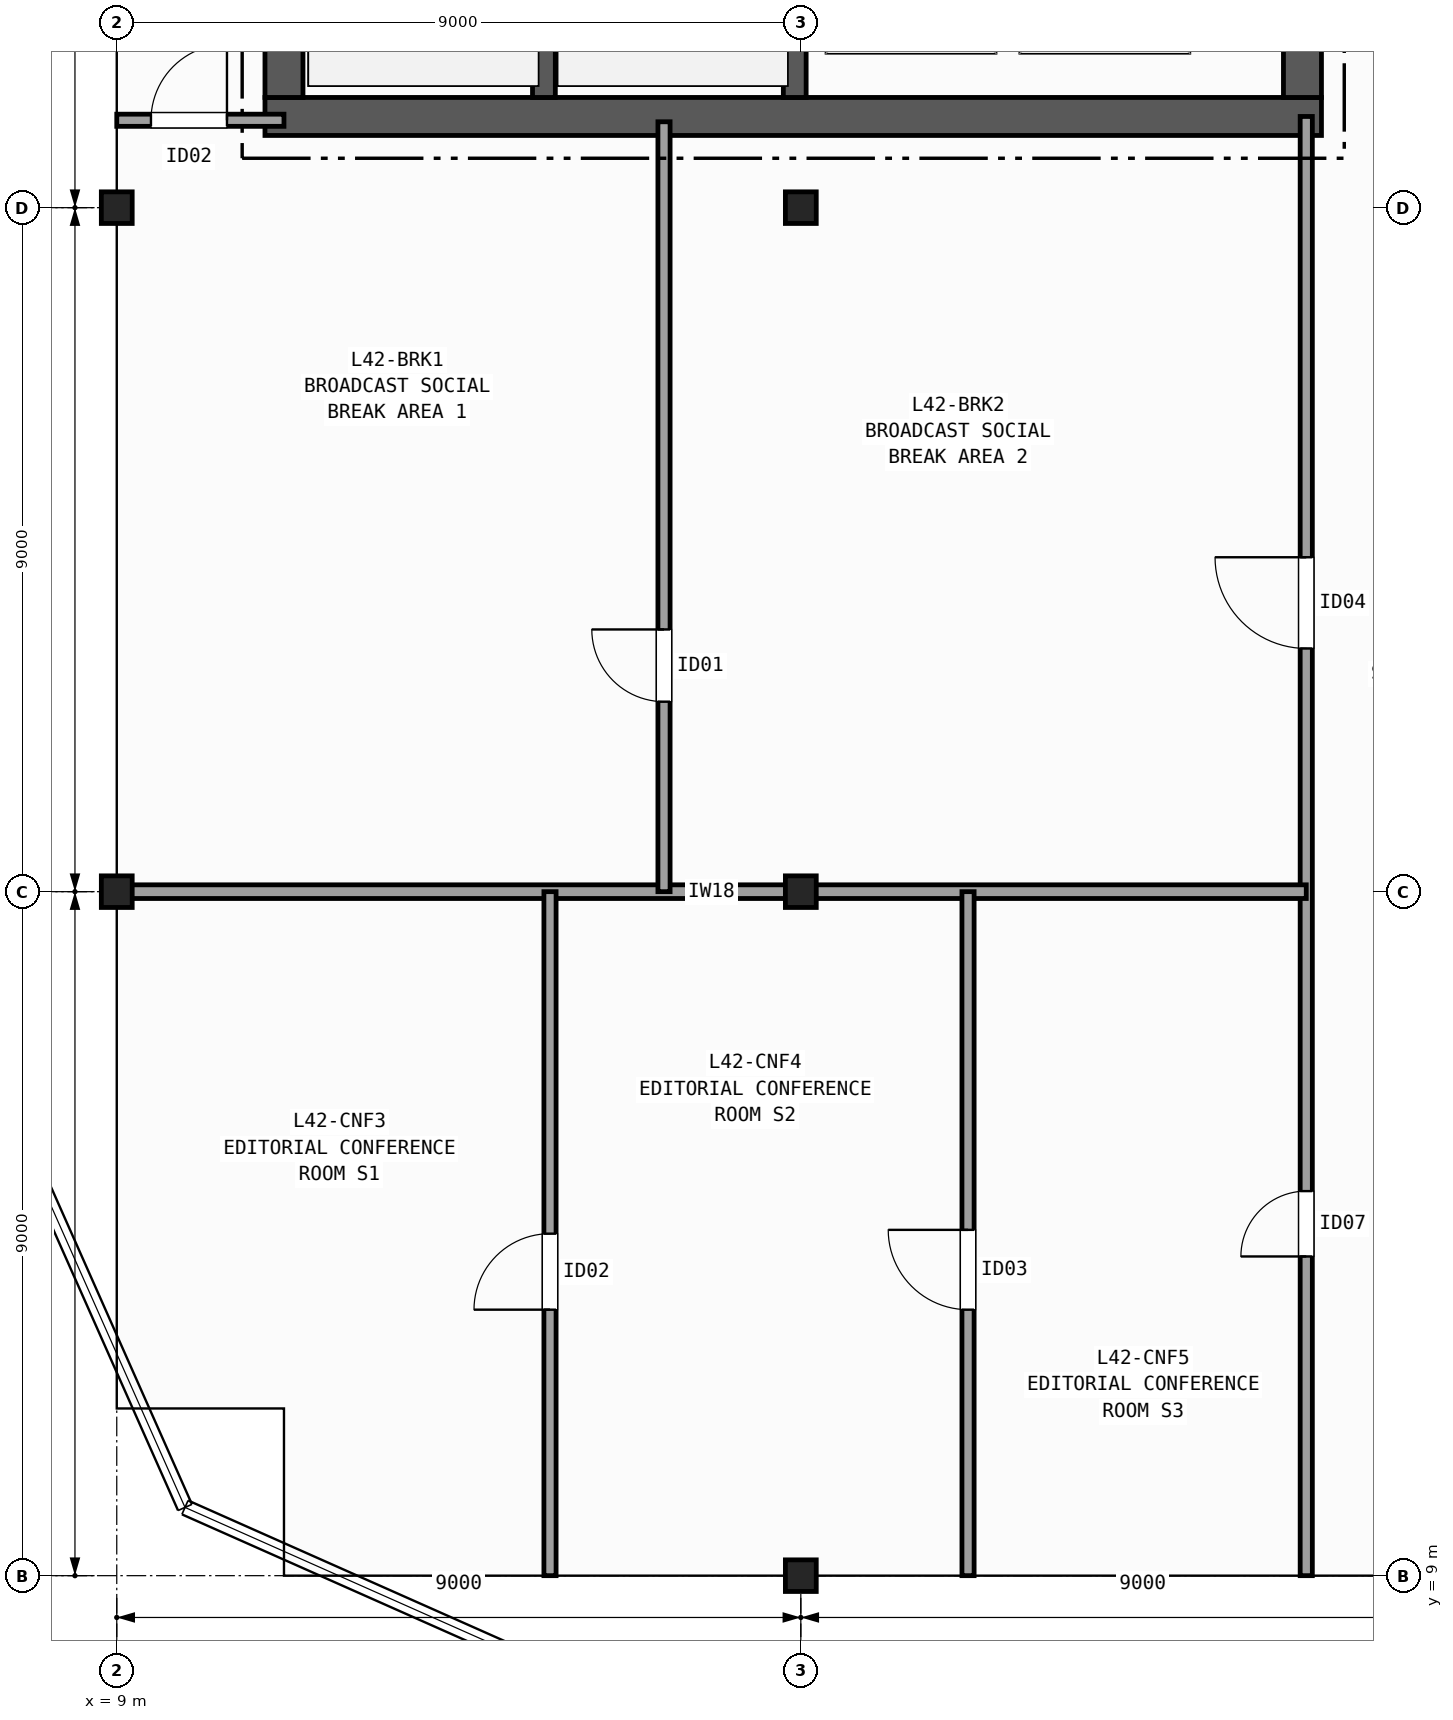
"""IFC4 building model, lengths in metres.
Left out: names, types, materials, properties, quantities, classifications, styles, units other than length and angle.
Written with IfcOpenShell. Run it as: python <this file> out.ifc"""

import sys

from ifc_helpers import new_model, si_unit, direction, frame, frame_2d, origin, origin_2d, place, context, subcontext, project, spatial, rectangle, i_section, extrude, element, fill, save


model = new_model("IFC4")
c1 = context("Model", 3, precision=1e-05, world=origin(), true_north=direction((0.0, 1.0)))
c2 = subcontext(c1, "Body", "Model", "MODEL_VIEW")
j1 = project(units=[si_unit("LENGTHUNIT", "METRE"), si_unit("PLANEANGLEUNIT", "RADIAN")], contexts=[c1])
p1 = place(None, origin())
s1 = spatial("IfcSite", under=j1, at=p1, CompositionType="ELEMENT")
p2 = place(p1, origin())
s2 = spatial("IfcBuilding", under=s1, at=p2, CompositionType="ELEMENT")
p3 = place(p2, frame((0.0, 0.0, 169.2)))
s3 = spatial("IfcBuildingStorey", under=s2, at=p3, CompositionType="ELEMENT", Elevation=169.2)
for number, where, z_axis, x_axis in (
    (1, (9.0, 18.0, 0.0), (0.0, 0.0, 1.0), (1.0, 0.0, 0.0)),
    (2, (9.0, 27.0, 0.0), (0.0, 0.0, 1.0), (1.0, 0.0, 0.0)),
    (3, (18.0, 9.0, 0.0), (0.0, 0.0, 1.0), (1.0, 0.0, 0.0)),
    (4, (18.0, 18.0, 0.0), (0.0, 0.0, 1.0), (1.0, 0.0, 0.0)),
    (5, (18.0, 27.0, 0.0), (0.0, 0.0, 1.0), (1.0, 0.0, 0.0)),
):
    element("IfcColumn", number, at=place(p3, frame(where, z_axis=z_axis, x_axis=x_axis)), inside=s3, PredefinedType="COLUMN", context=c2, shape_type="SweptSolid", body=[
        extrude(i_section(OverallWidth=0.406, OverallDepth=0.416, WebThickness=0.03, FlangeThickness=0.048, FilletRadius=0.015, at=origin_2d()), origin(), (0.0, 0.0, 1.0), 5.0),
    ])
p4 = place(p3, frame((10.95, 28.2, 0.0), z_axis=(0.0, 0.0, 1.0), x_axis=(1.0, 0.0, 0.0)))
e6 = element("IfcWall", 6, at=p4, inside=s3, PredefinedType="SHEAR", context=c2, shape_type="SweptSolid", body=[
    extrude(rectangle(XDim=13.9, YDim=0.5, at=frame_2d((6.95, 0.0))), origin(), (0.0, 0.0, 1.0), 4.72),
])
p5 = place(p3, frame((11.2, 42.15, 0.0), z_axis=(0.0, 0.0, 1.0), x_axis=(0.0, -1.0, 0.0)))
e7 = element("IfcWall", 7, at=p5, inside=s3, PredefinedType="SHEAR", context=c2, shape_type="SweptSolid", body=[
    extrude(rectangle(XDim=13.7, YDim=0.5, at=frame_2d((6.85, 0.0))), origin(), (0.0, 0.0, 1.0), 4.72),
])
p6 = place(p3, frame((24.6, 28.45, 0.0), z_axis=(0.0, 0.0, 1.0), x_axis=(0.0, 1.0, 0.0)))
e8 = element("IfcWall", 8, at=p6, inside=s3, PredefinedType="SHEAR", context=c2, shape_type="SweptSolid", body=[
    extrude(rectangle(XDim=13.7, YDim=0.5, at=frame_2d((6.85, 0.0))), origin(), (0.0, 0.0, 1.0), 4.72),
])
p7 = place(p6, frame((3.35, 0.0, 0.0)))
e9 = element("IfcOpeningElement", 9, at=p7, cuts=e8, PredefinedType="OPENING", context=c2, shape_type="SweptSolid", body=[
    extrude(rectangle(XDim=1.5, YDim=2.2, at=frame_2d((0.75, 1.1))), frame((0.0, 0.26, 0.0), z_axis=(0.0, -1.0, 0.0), x_axis=(1.0, 0.0, 0.0)), (0.0, 0.0, 1.0), 0.52),
])
p8 = place(p6, frame((9.95, 0.0, 0.0)))
e10 = element("IfcOpeningElement", 10, at=p8, cuts=e8, PredefinedType="OPENING", context=c2, shape_type="SweptSolid", body=[
    extrude(rectangle(XDim=0.9, YDim=2.1, at=frame_2d((0.45, 1.05))), frame((0.0, 0.26, 0.0), z_axis=(0.0, -1.0, 0.0), x_axis=(1.0, 0.0, 0.0)), (0.0, 0.0, 1.0), 0.52),
])
p9 = place(p6, frame((12.05, 0.0, 0.0)))
e11 = element("IfcOpeningElement", 11, at=p9, cuts=e8, PredefinedType="OPENING", context=c2, shape_type="SweptSolid", body=[
    extrude(rectangle(XDim=0.9, YDim=2.1, at=frame_2d((0.45, 1.05))), frame((0.0, 0.26, 0.0), z_axis=(0.0, -1.0, 0.0), x_axis=(1.0, 0.0, 0.0)), (0.0, 0.0, 1.0), 0.52),
])
p10 = place(p3, frame((14.62, 28.45, 0.0), z_axis=(0.0, 0.0, 1.0), x_axis=(0.0, 1.0, 0.0)))
e12 = element("IfcWall", 12, at=p10, inside=s3, PredefinedType="SHEAR", context=c2, shape_type="SweptSolid", body=[
    extrude(rectangle(XDim=9.0, YDim=0.3, at=frame_2d((4.5, 0.0))), origin(), (0.0, 0.0, 1.0), 4.72),
])
p11 = place(p3, frame((17.92, 42.15, 0.0), z_axis=(0.0, 0.0, 1.0), x_axis=(0.0, -1.0, 0.0)))
e13 = element("IfcWall", 13, at=p11, inside=s3, PredefinedType="SHEAR", context=c2, shape_type="SweptSolid", body=[
    extrude(rectangle(XDim=13.7, YDim=0.3, at=frame_2d((6.85, 0.0))), origin(), (0.0, 0.0, 1.0), 4.72),
])
p12 = place(p11, frame((1.975, 0.0, 0.0)))
e14 = element("IfcOpeningElement", 14, at=p12, cuts=e13, PredefinedType="OPENING", context=c2, shape_type="SweptSolid", body=[
    extrude(rectangle(XDim=1.15, YDim=2.15, at=frame_2d((0.575, 1.075))), frame((0.0, 0.16, 0.0), z_axis=(0.0, -1.0, 0.0), x_axis=(1.0, 0.0, 0.0)), (0.0, 0.0, 1.0), 0.32),
])
p13 = place(p3, frame((9.0, 28.15, 0.0), z_axis=(0.0, 0.0, 1.0), x_axis=(1.0, 0.0, 0.0)))
e15 = element("IfcWall", 15, at=p13, inside=s3, PredefinedType="PARTITIONING", context=c2, shape_type="SweptSolid", body=[
    extrude(rectangle(XDim=2.2, YDim=0.16, at=frame_2d((1.1, 0.0))), origin(), (0.0, 0.0, 1.0), 3.934),
])
p14 = place(p13, frame((0.45, 0.0, 0.0)))
e16 = element("IfcOpeningElement", 16, at=p14, cuts=e15, PredefinedType="OPENING", context=c2, shape_type="SweptSolid", body=[
    extrude(rectangle(XDim=1.0, YDim=2.1, at=frame_2d((0.5, 1.05))), frame((0.0, 0.09, 0.0), z_axis=(0.0, -1.0, 0.0), x_axis=(1.0, 0.0, 0.0)), (0.0, 0.0, 1.0), 0.18),
])
p15 = place(p3, frame((24.65, 9.0, 0.0), z_axis=(0.0, 0.0, 1.0), x_axis=(0.0, 1.0, 0.0)))
e17 = element("IfcWall", 17, at=p15, inside=s3, PredefinedType="PARTITIONING", context=c2, shape_type="SweptSolid", body=[
    extrude(rectangle(XDim=19.2, YDim=0.16, at=frame_2d((9.6, 0.0))), origin(), (0.0, 0.0, 1.0), 3.934),
])
p16 = place(p15, frame((12.2, 0.0, 0.0)))
e18 = element("IfcOpeningElement", 18, at=p16, cuts=e17, PredefinedType="OPENING", context=c2, shape_type="SweptSolid", body=[
    extrude(rectangle(XDim=1.2, YDim=2.15, at=frame_2d((0.6, 1.075))), frame((0.0, 0.09, 0.0), z_axis=(0.0, -1.0, 0.0), x_axis=(1.0, 0.0, 0.0)), (0.0, 0.0, 1.0), 0.18),
])
p17 = place(p15, frame((4.2, 0.0, 0.0)))
e19 = element("IfcOpeningElement", 19, at=p17, cuts=e17, PredefinedType="OPENING", context=c2, shape_type="SweptSolid", body=[
    extrude(rectangle(XDim=0.86, YDim=2.05, at=frame_2d((0.43, 1.025))), frame((0.0, 0.09, 0.0), z_axis=(0.0, -1.0, 0.0), x_axis=(1.0, 0.0, 0.0)), (0.0, 0.0, 1.0), 0.18),
])
p18 = place(p3, frame((9.0, 18.0, 0.0), z_axis=(0.0, 0.0, 1.0), x_axis=(1.0, 0.0, 0.0)))
e20 = element("IfcWall", 20, at=p18, inside=s3, PredefinedType="PARTITIONING", context=c2, shape_type="SweptSolid", body=[
    extrude(rectangle(XDim=15.65, YDim=0.18, at=frame_2d((7.825, 0.0))), origin(), (0.0, 0.0, 1.0), 3.934),
])
p19 = place(p3, frame((16.2, 18.0, 0.0), z_axis=(0.0, 0.0, 1.0), x_axis=(0.0, 1.0, 0.0)))
e21 = element("IfcWall", 21, at=p19, inside=s3, PredefinedType="PARTITIONING", context=c2, shape_type="SweptSolid", body=[
    extrude(rectangle(XDim=10.13, YDim=0.16, at=frame_2d((5.065, 0.0))), origin(), (0.0, 0.0, 1.0), 4.089),
])
p20 = place(p19, frame((2.5, 0.0, 0.0)))
e22 = element("IfcOpeningElement", 22, at=p20, cuts=e21, PredefinedType="OPENING", context=c2, shape_type="SweptSolid", body=[
    extrude(rectangle(XDim=0.95, YDim=2.1, at=frame_2d((0.475, 1.05))), frame((0.0, 0.09, 0.0), z_axis=(0.0, -1.0, 0.0), x_axis=(1.0, 0.0, 0.0)), (0.0, 0.0, 1.0), 0.18),
])
p21 = place(p3, frame((14.7, 9.0, 0.0), z_axis=(0.0, 0.0, 1.0), x_axis=(0.0, 1.0, 0.0)))
e23 = element("IfcWall", 23, at=p21, inside=s3, PredefinedType="PARTITIONING", context=c2, shape_type="SweptSolid", body=[
    extrude(rectangle(XDim=9.0, YDim=0.16, at=frame_2d((4.5, 0.0))), origin(), (0.0, 0.0, 1.0), 4.089),
])
p22 = place(p21, frame((3.5, 0.0, 0.0)))
e24 = element("IfcOpeningElement", 24, at=p22, cuts=e23, PredefinedType="OPENING", context=c2, shape_type="SweptSolid", body=[
    extrude(rectangle(XDim=1.0, YDim=2.1, at=frame_2d((0.5, 1.05))), frame((0.0, 0.09, 0.0), z_axis=(0.0, -1.0, 0.0), x_axis=(1.0, 0.0, 0.0)), (0.0, 0.0, 1.0), 0.18),
])
p23 = place(p3, frame((20.2, 9.0, 0.0), z_axis=(0.0, 0.0, 1.0), x_axis=(0.0, 1.0, 0.0)))
e25 = element("IfcWall", 25, at=p23, inside=s3, PredefinedType="PARTITIONING", context=c2, shape_type="SweptSolid", body=[
    extrude(rectangle(XDim=9.0, YDim=0.16, at=frame_2d((4.5, 0.0))), origin(), (0.0, 0.0, 1.0), 3.934),
])
p24 = place(p23, frame((3.5, 0.0, 0.0)))
e26 = element("IfcOpeningElement", 26, at=p24, cuts=e25, PredefinedType="OPENING", context=c2, shape_type="SweptSolid", body=[
    extrude(rectangle(XDim=1.05, YDim=2.15, at=frame_2d((0.525, 1.075))), frame((0.0, 0.09, 0.0), z_axis=(0.0, -1.0, 0.0), x_axis=(1.0, 0.0, 0.0)), (0.0, 0.0, 1.0), 0.18),
])
p25 = place(p14, origin())
e27 = element("IfcDoor", 27, at=p25, inside=s3, OperationType="SINGLE_SWING_RIGHT", PredefinedType="DOOR", context=c2, shape_type="SweptSolid", body=[
    extrude(rectangle(XDim=1.0, YDim=2.1, at=frame_2d((0.5, 1.05))), frame((0.0, 0.025, 0.0), z_axis=(0.0, -1.0, 0.0), x_axis=(1.0, 0.0, 0.0)), (0.0, 0.0, 1.0), 0.05),
])
fill(e16, e27)
p26 = place(p16, origin())
e28 = element("IfcDoor", 28, at=p26, inside=s3, OperationType="SINGLE_SWING_RIGHT", PredefinedType="DOOR", context=c2, shape_type="SweptSolid", body=[
    extrude(rectangle(XDim=1.2, YDim=2.15, at=frame_2d((0.6, 1.075))), frame((0.0, 0.025, 0.0), z_axis=(0.0, -1.0, 0.0), x_axis=(1.0, 0.0, 0.0)), (0.0, 0.0, 1.0), 0.05),
])
fill(e18, e28)
p27 = place(p17, origin())
e29 = element("IfcDoor", 29, at=p27, inside=s3, OperationType="SINGLE_SWING_LEFT", PredefinedType="DOOR", context=c2, shape_type="SweptSolid", body=[
    extrude(rectangle(XDim=0.86, YDim=2.05, at=frame_2d((0.43, 1.025))), frame((0.0, 0.025, 0.0), z_axis=(0.0, -1.0, 0.0), x_axis=(1.0, 0.0, 0.0)), (0.0, 0.0, 1.0), 0.05),
])
fill(e19, e29)
p28 = place(p20, origin())
e30 = element("IfcDoor", 30, at=p28, inside=s3, OperationType="SINGLE_SWING_RIGHT", PredefinedType="DOOR", context=c2, shape_type="SweptSolid", body=[
    extrude(rectangle(XDim=0.95, YDim=2.1, at=frame_2d((0.475, 1.05))), frame((0.0, 0.025, 0.0), z_axis=(0.0, -1.0, 0.0), x_axis=(1.0, 0.0, 0.0)), (0.0, 0.0, 1.0), 0.05),
])
fill(e22, e30)
p29 = place(p22, origin())
e31 = element("IfcDoor", 31, at=p29, inside=s3, OperationType="SINGLE_SWING_LEFT", PredefinedType="DOOR", context=c2, shape_type="SweptSolid", body=[
    extrude(rectangle(XDim=1.0, YDim=2.1, at=frame_2d((0.5, 1.05))), frame((0.0, 0.025, 0.0), z_axis=(0.0, -1.0, 0.0), x_axis=(1.0, 0.0, 0.0)), (0.0, 0.0, 1.0), 0.05),
])
fill(e24, e31)
p30 = place(p24, origin())
e32 = element("IfcDoor", 32, at=p30, inside=s3, OperationType="SINGLE_SWING_RIGHT", PredefinedType="DOOR", context=c2, shape_type="SweptSolid", body=[
    extrude(rectangle(XDim=1.05, YDim=2.15, at=frame_2d((0.525, 1.075))), frame((0.0, 0.025, 0.0), z_axis=(0.0, -1.0, 0.0), x_axis=(1.0, 0.0, 0.0)), (0.0, 0.0, 1.0), 0.05),
])
fill(e26, e32)
save(model, sys.argv[1])
